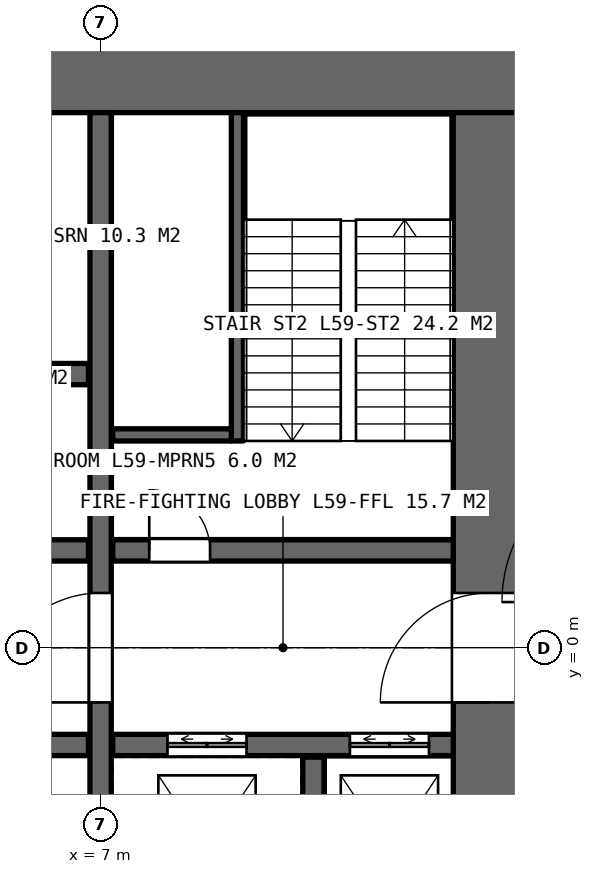
"""IFC4 building model, lengths in metres.
Left out: names, types, materials, properties, quantities, classifications, styles, units other than length and angle.
Written with IfcOpenShell. Run it as: python <this file> out.ifc"""

import sys

from ifc_helpers import new_model, si_unit, direction, frame, frame_2d, origin, place, context, subcontext, project, spatial, rectangle, extrude, element, fill, save


model = new_model("IFC4")
c1 = context("Model", 3, precision=1e-05, world=origin(), true_north=direction((0.0, 1.0)))
c2 = subcontext(c1, "Body", "Model", "MODEL_VIEW")
j1 = project(units=[si_unit("LENGTHUNIT", "METRE"), si_unit("PLANEANGLEUNIT", "RADIAN")], contexts=[c1])
p1 = place(None, origin())
s1 = spatial("IfcSite", under=j1, at=p1, CompositionType="ELEMENT")
p2 = place(p1, origin())
s2 = spatial("IfcBuilding", under=s1, at=p2, CompositionType="ELEMENT")
p3 = place(p2, frame((0.0, 0.0, 266.2)))
s3 = spatial("IfcBuildingStorey", under=s2, at=p3, CompositionType="ELEMENT", Elevation=266.2)
p4 = place(p3, frame((14.0, 9.4, 0.0), z_axis=(0.0, 0.0, 1.0), x_axis=(-1.0, 0.0, 0.0)))
e1 = element("IfcWall", 1, at=p4, inside=s3, PredefinedType="SHEAR", context=c2, shape_type="SweptSolid", body=[
    extrude(rectangle(XDim=28.0, YDim=1.2, at=frame_2d((14.0, 0.0))), origin(), (0.0, 0.0, 1.0), 5.0),
])
p5 = place(p4, frame((24.0, 0.0, 0.0)))
e2 = element("IfcOpeningElement", 2, at=p5, cuts=e1, PredefinedType="OPENING", context=c2, shape_type="SweptSolid", body=[
    extrude(rectangle(XDim=1.0, YDim=2.4, at=frame_2d((0.5, 1.2))), frame((0.0, 0.61, 0.0), z_axis=(0.0, -1.0, 0.0), x_axis=(1.0, 0.0, 0.0)), (0.0, 0.0, 1.0), 1.22),
])
p6 = place(p3, frame((13.4, -8.8, 0.0), z_axis=(0.0, 0.0, 1.0), x_axis=(0.0, 1.0, 0.0)))
e3 = element("IfcWall", 3, at=p6, inside=s3, PredefinedType="SHEAR", context=c2, shape_type="SweptSolid", body=[
    extrude(rectangle(XDim=17.6, YDim=1.2, at=frame_2d((8.8, 0.0))), origin(), (0.0, 0.0, 1.0), 5.0),
])
p7 = place(p6, frame((7.9, 0.0, 0.0)))
e4 = element("IfcOpeningElement", 4, at=p7, cuts=e3, PredefinedType="OPENING", context=c2, shape_type="SweptSolid", body=[
    extrude(rectangle(XDim=1.8, YDim=2.4, at=frame_2d((0.9, 1.2))), frame((0.0, 0.61, 0.0), z_axis=(0.0, -1.0, 0.0), x_axis=(1.0, 0.0, 0.0)), (0.0, 0.0, 1.0), 1.22),
])
p8 = place(p3, frame((7.0, -8.8, 0.0), z_axis=(0.0, 0.0, 1.0), x_axis=(0.0, 1.0, 0.0)))
e5 = element("IfcWall", 5, at=p8, inside=s3, PredefinedType="SHEAR", context=c2, shape_type="SweptSolid", body=[
    extrude(rectangle(XDim=17.6, YDim=0.35, at=frame_2d((8.8, 0.0))), origin(), (0.0, 0.0, 1.0), 5.0),
])
p9 = place(p8, frame((7.9, 0.0, 0.0)))
e6 = element("IfcOpeningElement", 6, at=p9, cuts=e5, PredefinedType="OPENING", context=c2, shape_type="SweptSolid", body=[
    extrude(rectangle(XDim=1.8, YDim=2.4, at=frame_2d((0.9, 1.2))), frame((0.0, 0.185, 0.0), z_axis=(0.0, -1.0, 0.0), x_axis=(1.0, 0.0, 0.0)), (0.0, 0.0, 1.0), 0.37),
])
p10 = place(p3, frame((-6.8, 1.6, 0.0), z_axis=(0.0, 0.0, 1.0), x_axis=(1.0, 0.0, 0.0)))
e7 = element("IfcWall", 7, at=p10, inside=s3, PredefinedType="SHEAR", context=c2, shape_type="SweptSolid", body=[
    extrude(rectangle(XDim=13.6, YDim=0.35, at=frame_2d((6.8, 0.0))), origin(), (0.0, 0.0, 1.0), 5.0),
])
p11 = place(p10, frame((0.765, 0.0, 0.0)))
e8 = element("IfcOpeningElement", 8, at=p11, cuts=e7, PredefinedType="OPENING", context=c2, shape_type="SweptSolid", body=[
    extrude(rectangle(XDim=1.0, YDim=2.4, at=frame_2d((0.5, 1.2))), frame((0.0, 0.185, 0.0), z_axis=(0.0, -1.0, 0.0), x_axis=(1.0, 0.0, 0.0)), (0.0, 0.0, 1.0), 0.37),
])
p12 = place(p10, frame((3.5, 0.0, 0.0)))
e9 = element("IfcOpeningElement", 9, at=p12, cuts=e7, PredefinedType="OPENING", context=c2, shape_type="SweptSolid", body=[
    extrude(rectangle(XDim=1.0, YDim=2.4, at=frame_2d((0.5, 1.2))), frame((0.0, 0.185, 0.0), z_axis=(0.0, -1.0, 0.0), x_axis=(1.0, 0.0, 0.0)), (0.0, 0.0, 1.0), 0.37),
])
p13 = place(p10, frame((6.3, 0.0, 0.0)))
e10 = element("IfcOpeningElement", 10, at=p13, cuts=e7, PredefinedType="OPENING", context=c2, shape_type="SweptSolid", body=[
    extrude(rectangle(XDim=1.0, YDim=2.4, at=frame_2d((0.5, 1.2))), frame((0.0, 0.185, 0.0), z_axis=(0.0, -1.0, 0.0), x_axis=(1.0, 0.0, 0.0)), (0.0, 0.0, 1.0), 0.37),
])
p14 = place(p10, frame((9.035, 0.0, 0.0)))
e11 = element("IfcOpeningElement", 11, at=p14, cuts=e7, PredefinedType="OPENING", context=c2, shape_type="SweptSolid", body=[
    extrude(rectangle(XDim=1.0, YDim=2.4, at=frame_2d((0.5, 1.2))), frame((0.0, 0.185, 0.0), z_axis=(0.0, -1.0, 0.0), x_axis=(1.0, 0.0, 0.0)), (0.0, 0.0, 1.0), 0.37),
])
p15 = place(p10, frame((11.9, 0.0, 0.0)))
e12 = element("IfcOpeningElement", 12, at=p15, cuts=e7, PredefinedType="OPENING", context=c2, shape_type="SweptSolid", body=[
    extrude(rectangle(XDim=1.0, YDim=2.4, at=frame_2d((0.5, 1.2))), frame((0.0, 0.185, 0.0), z_axis=(0.0, -1.0, 0.0), x_axis=(1.0, 0.0, 0.0)), (0.0, 0.0, 1.0), 0.37),
])
p16 = place(p3, frame((-6.8, -1.6, 0.0), z_axis=(0.0, 0.0, 1.0), x_axis=(1.0, 0.0, 0.0)))
e13 = element("IfcWall", 13, at=p16, inside=s3, PredefinedType="SHEAR", context=c2, shape_type="SweptSolid", body=[
    extrude(rectangle(XDim=13.6, YDim=0.35, at=frame_2d((6.8, 0.0))), origin(), (0.0, 0.0, 1.0), 5.0),
])
p17 = place(p16, frame((0.765, 0.0, 0.0)))
e14 = element("IfcOpeningElement", 14, at=p17, cuts=e13, PredefinedType="OPENING", context=c2, shape_type="SweptSolid", body=[
    extrude(rectangle(XDim=1.0, YDim=2.4, at=frame_2d((0.5, 1.2))), frame((0.0, 0.185, 0.0), z_axis=(0.0, -1.0, 0.0), x_axis=(1.0, 0.0, 0.0)), (0.0, 0.0, 1.0), 0.37),
])
p18 = place(p16, frame((3.5, 0.0, 0.0)))
e15 = element("IfcOpeningElement", 15, at=p18, cuts=e13, PredefinedType="OPENING", context=c2, shape_type="SweptSolid", body=[
    extrude(rectangle(XDim=1.0, YDim=2.4, at=frame_2d((0.5, 1.2))), frame((0.0, 0.185, 0.0), z_axis=(0.0, -1.0, 0.0), x_axis=(1.0, 0.0, 0.0)), (0.0, 0.0, 1.0), 0.37),
])
p19 = place(p16, frame((6.25, 0.0, 0.0)))
e16 = element("IfcOpeningElement", 16, at=p19, cuts=e13, PredefinedType="OPENING", context=c2, shape_type="SweptSolid", body=[
    extrude(rectangle(XDim=1.1, YDim=2.4, at=frame_2d((0.55, 1.2))), frame((0.0, 0.185, 0.0), z_axis=(0.0, -1.0, 0.0), x_axis=(1.0, 0.0, 0.0)), (0.0, 0.0, 1.0), 0.37),
])
p20 = place(p16, frame((9.085, 0.0, 0.0)))
e17 = element("IfcOpeningElement", 17, at=p20, cuts=e13, PredefinedType="OPENING", context=c2, shape_type="SweptSolid", body=[
    extrude(rectangle(XDim=0.9, YDim=2.4, at=frame_2d((0.45, 1.2))), frame((0.0, 0.185, 0.0), z_axis=(0.0, -1.0, 0.0), x_axis=(1.0, 0.0, 0.0)), (0.0, 0.0, 1.0), 0.37),
])
p21 = place(p16, frame((11.9, 0.0, 0.0)))
e18 = element("IfcOpeningElement", 18, at=p21, cuts=e13, PredefinedType="OPENING", context=c2, shape_type="SweptSolid", body=[
    extrude(rectangle(XDim=1.0, YDim=2.4, at=frame_2d((0.5, 1.2))), frame((0.0, 0.185, 0.0), z_axis=(0.0, -1.0, 0.0), x_axis=(1.0, 0.0, 0.0)), (0.0, 0.0, 1.0), 0.37),
])
p22 = place(p3, frame((-6.8, 4.5, 0.0), z_axis=(0.0, 0.0, 1.0), x_axis=(1.0, 0.0, 0.0)))
e19 = element("IfcWall", 19, at=p22, inside=s3, PredefinedType="SHEAR", context=c2, shape_type="SweptSolid", body=[
    extrude(rectangle(XDim=13.6, YDim=0.35, at=frame_2d((6.8, 0.0))), origin(), (0.0, 0.0, 1.0), 5.0),
])
p23 = place(p3, frame((7.2, 1.6, 0.0), z_axis=(0.0, 0.0, 1.0), x_axis=(1.0, 0.0, 0.0)))
e20 = element("IfcWall", 20, at=p23, inside=s3, PredefinedType="SHEAR", context=c2, shape_type="SweptSolid", body=[
    extrude(rectangle(XDim=5.6, YDim=0.35, at=frame_2d((2.8, 0.0))), origin(), (0.0, 0.0, 1.0), 5.0),
])
p24 = place(p23, frame((0.6, 0.0, 0.0)))
e21 = element("IfcOpeningElement", 21, at=p24, cuts=e20, PredefinedType="OPENING", context=c2, shape_type="SweptSolid", body=[
    extrude(rectangle(XDim=1.0, YDim=2.4, at=frame_2d((0.5, 1.2))), frame((0.0, 0.185, 0.0), z_axis=(0.0, -1.0, 0.0), x_axis=(1.0, 0.0, 0.0)), (0.0, 0.0, 1.0), 0.37),
])
p25 = place(p3, frame((7.2, -1.6, 0.0), z_axis=(0.0, 0.0, 1.0), x_axis=(1.0, 0.0, 0.0)))
e22 = element("IfcWall", 22, at=p25, inside=s3, PredefinedType="SHEAR", context=c2, shape_type="SweptSolid", body=[
    extrude(rectangle(XDim=5.6, YDim=0.35, at=frame_2d((2.8, 0.0))), origin(), (0.0, 0.0, 1.0), 5.0),
])
p26 = place(p25, frame((0.9, 0.0, 0.0)))
e23 = element("IfcOpeningElement", 23, at=p26, cuts=e22, PredefinedType="OPENING", context=c2, shape_type="SweptSolid", body=[
    extrude(rectangle(XDim=1.3, YDim=2.4, at=frame_2d((0.65, 1.2))), frame((0.0, 0.185, 0.0), z_axis=(0.0, -1.0, 0.0), x_axis=(1.0, 0.0, 0.0)), (0.0, 0.0, 1.0), 0.37),
])
p27 = place(p25, frame((3.9, 0.0, 0.0)))
e24 = element("IfcOpeningElement", 24, at=p27, cuts=e22, PredefinedType="OPENING", context=c2, shape_type="SweptSolid", body=[
    extrude(rectangle(XDim=1.3, YDim=2.4, at=frame_2d((0.65, 1.2))), frame((0.0, 0.185, 0.0), z_axis=(0.0, -1.0, 0.0), x_axis=(1.0, 0.0, 0.0)), (0.0, 0.0, 1.0), 0.37),
])
p28 = place(p3, frame((10.5, -4.8, 0.0), z_axis=(0.0, 0.0, 1.0), x_axis=(0.0, 1.0, 0.0)))
e25 = element("IfcWall", 25, at=p28, inside=s3, PredefinedType="SHEAR", context=c2, shape_type="SweptSolid", body=[
    extrude(rectangle(XDim=3.0, YDim=0.35, at=frame_2d((1.5, 0.0))), origin(), (0.0, 0.0, 1.0), 5.0),
])
p29 = place(p3, frame((9.25, 3.4, 0.0), z_axis=(0.0, 0.0, 1.0), x_axis=(0.0, 1.0, 0.0)))
e26 = element("IfcWall", 26, at=p29, inside=s3, PredefinedType="SOLIDWALL", context=c2, shape_type="SweptSolid", body=[
    extrude(rectangle(XDim=5.4, YDim=0.2, at=frame_2d((2.7, 0.0))), origin(), (0.0, 0.0, 1.0), 5.0),
])
p30 = place(p3, frame((9.15, 3.5, 0.0), z_axis=(0.0, 0.0, 1.0), x_axis=(-1.0, 0.0, 0.0)))
e27 = element("IfcWall", 27, at=p30, inside=s3, PredefinedType="SOLIDWALL", context=c2, shape_type="SweptSolid", body=[
    extrude(rectangle(XDim=1.95, YDim=0.2, at=frame_2d((0.975, 0.0))), origin(), (0.0, 0.0, 1.0), 5.0),
])
p31 = place(p7, origin())
e28 = element("IfcDoor", 28, at=p31, inside=s3, OperationType="DOUBLE_DOOR_SINGLE_SWING", PredefinedType="DOOR", context=c2, shape_type="SweptSolid", body=[
    extrude(rectangle(XDim=1.8, YDim=2.4, at=frame_2d((0.9, 1.2))), frame((0.0, 0.025, 0.0), z_axis=(0.0, -1.0, 0.0), x_axis=(1.0, 0.0, 0.0)), (0.0, 0.0, 1.0), 0.05),
])
fill(e4, e28)
p32 = place(p9, origin())
e29 = element("IfcDoor", 29, at=p32, inside=s3, OperationType="DOUBLE_DOOR_SINGLE_SWING", PredefinedType="DOOR", context=c2, shape_type="SweptSolid", body=[
    extrude(rectangle(XDim=1.8, YDim=2.4, at=frame_2d((0.9, 1.2))), frame((0.0, 0.025, 0.0), z_axis=(0.0, -1.0, 0.0), x_axis=(1.0, 0.0, 0.0)), (0.0, 0.0, 1.0), 0.05),
])
fill(e6, e29)
p33 = place(p24, origin())
e30 = element("IfcDoor", 30, at=p33, inside=s3, OperationType="SINGLE_SWING_LEFT", PredefinedType="DOOR", context=c2, shape_type="SweptSolid", body=[
    extrude(rectangle(XDim=1.0, YDim=2.4, at=frame_2d((0.5, 1.2))), frame((0.0, 0.025, 0.0), z_axis=(0.0, -1.0, 0.0), x_axis=(1.0, 0.0, 0.0)), (0.0, 0.0, 1.0), 0.05),
])
fill(e21, e30)
p34 = place(p26, origin())
e31 = element("IfcDoor", 31, at=p34, inside=s3, OperationType="DOUBLE_DOOR_SLIDING", PredefinedType="DOOR", context=c2, shape_type="SweptSolid", body=[
    extrude(rectangle(XDim=1.3, YDim=2.4, at=frame_2d((0.65, 1.2))), frame((0.0, 0.025, 0.0), z_axis=(0.0, -1.0, 0.0), x_axis=(1.0, 0.0, 0.0)), (0.0, 0.0, 1.0), 0.05),
])
fill(e23, e31)
p35 = place(p27, origin())
e32 = element("IfcDoor", 32, at=p35, inside=s3, OperationType="DOUBLE_DOOR_SLIDING", PredefinedType="DOOR", context=c2, shape_type="SweptSolid", body=[
    extrude(rectangle(XDim=1.3, YDim=2.4, at=frame_2d((0.65, 1.2))), frame((0.0, 0.025, 0.0), z_axis=(0.0, -1.0, 0.0), x_axis=(1.0, 0.0, 0.0)), (0.0, 0.0, 1.0), 0.05),
])
fill(e24, e32)
save(model, sys.argv[1])
